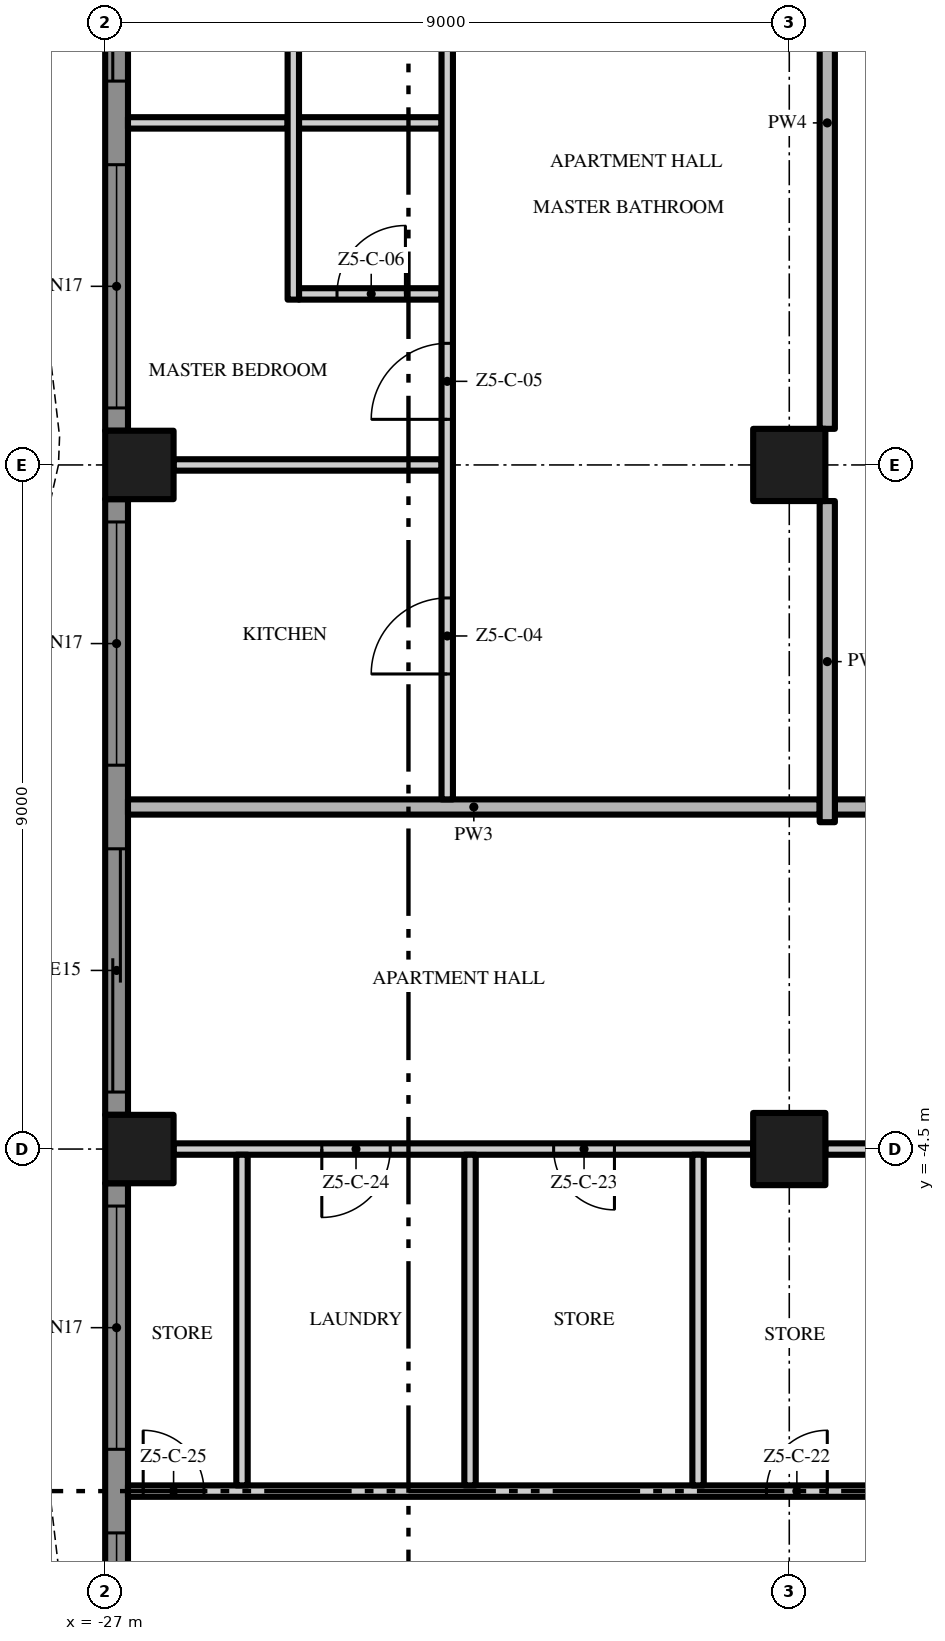
"""IFC4 building model, lengths in metres.
Left out: names, types, materials, properties, quantities, classifications, styles, units other than length and angle.
Written with IfcOpenShell. Run it as: python <this file> out.ifc"""

import sys

from ifc_helpers import new_model, si_unit, direction, frame, frame_2d, origin, origin_2d, place, context, subcontext, project, spatial, polyline, rectangle, outline, extrude, element, fill, save


model = new_model("IFC4")
c1 = context("Model", 3, precision=1e-05, world=origin(), true_north=direction((0.0, 1.0)))
c2 = subcontext(c1, "Body", "Model", "MODEL_VIEW")
j1 = project(units=[si_unit("LENGTHUNIT", "METRE"), si_unit("PLANEANGLEUNIT", "RADIAN")], contexts=[c1])
p1 = place(None, origin())
s1 = spatial("IfcSite", under=j1, at=p1, CompositionType="ELEMENT")
p2 = place(p1, origin())
s2 = spatial("IfcBuilding", under=s1, at=p2, CompositionType="ELEMENT")
p3 = place(p2, frame((0.0, 0.0, 269.2)))
s3 = spatial("IfcBuildingStorey", under=s2, at=p3, CompositionType="ELEMENT", Elevation=269.2)
for number, where, z_axis, x_axis in (
    (1, (-18.0, -4.5, 0.0), (0.0, 0.0, 1.0), (1.0, 0.0, 0.0)),
    (2, (-18.0, 4.5, 0.0), (0.0, 0.0, 1.0), (1.0, 0.0, 0.0)),
):
    element("IfcColumn", number, at=place(p3, frame(where, z_axis=z_axis, x_axis=x_axis)), inside=s3, PredefinedType="COLUMN", context=c2, shape_type="SweptSolid", body=[
        extrude(rectangle(XDim=0.95, YDim=0.95, at=origin_2d()), origin(), (0.0, 0.0, 1.0), 3.5),
    ])
for number, where, z_axis, x_axis in (
    (3, (-26.55, -4.5, 0.0), (0.0, 0.0, 1.0), (1.0, 0.0, 0.0)),
    (4, (-26.55, 4.5, 0.0), (0.0, 0.0, 1.0), (1.0, 0.0, 0.0)),
):
    element("IfcColumn", number, at=place(p3, frame(where, z_axis=z_axis, x_axis=x_axis)), inside=s3, PredefinedType="COLUMN", context=c2, shape_type="SweptSolid", body=[
        extrude(rectangle(XDim=0.9, YDim=0.9, at=origin_2d()), origin(), (0.0, 0.0, 1.0), 3.5),
    ])
p4 = place(p3, frame((-26.85, 4.95, 0.0), z_axis=(0.0, 0.0, 1.0), x_axis=(0.0, 1.0, 0.0)))
e5 = element("IfcWall", 5, at=p4, inside=s3, PredefinedType="SOLIDWALL", context=c2, shape_type="SweptSolid", body=[
    extrude(rectangle(XDim=8.1, YDim=0.3, at=frame_2d((4.05, 0.0))), origin(), (0.0, 0.0, 1.0), 3.5),
])
p5 = place(p4, frame((4.6, 0.0, 0.0)))
e6 = element("IfcOpeningElement", 6, at=p5, cuts=e5, PredefinedType="OPENING", context=c2, shape_type="SweptSolid", body=[
    extrude(rectangle(XDim=3.2, YDim=2.4, at=frame_2d((1.6, 1.2))), frame((0.0, 0.16, 0.0), z_axis=(0.0, -1.0, 0.0), x_axis=(1.0, 0.0, 0.0)), (0.0, 0.0, 1.0), 0.32),
])
p6 = place(p4, frame((0.3, 0.0, 0.45)))
e7 = element("IfcOpeningElement", 7, at=p6, cuts=e5, PredefinedType="OPENING", context=c2, shape_type="SweptSolid", body=[
    extrude(rectangle(XDim=3.2, YDim=2.65, at=frame_2d((1.6, 1.325))), frame((0.0, 0.16, 0.0), z_axis=(0.0, -1.0, 0.0), x_axis=(1.0, 0.0, 0.0)), (0.0, 0.0, 1.0), 0.32),
])
p7 = place(p3, frame((-26.85, -4.05, 0.0), z_axis=(0.0, 0.0, 1.0), x_axis=(0.0, 1.0, 0.0)))
e8 = element("IfcWall", 8, at=p7, inside=s3, PredefinedType="SOLIDWALL", context=c2, shape_type="SweptSolid", body=[
    extrude(rectangle(XDim=8.1, YDim=0.3, at=frame_2d((4.05, 0.0))), origin(), (0.0, 0.0, 1.0), 3.5),
])
p8 = place(p7, frame((4.6, 0.0, 0.45)))
e9 = element("IfcOpeningElement", 9, at=p8, cuts=e8, PredefinedType="OPENING", context=c2, shape_type="SweptSolid", body=[
    extrude(rectangle(XDim=3.2, YDim=2.65, at=frame_2d((1.6, 1.325))), frame((0.0, 0.16, 0.0), z_axis=(0.0, -1.0, 0.0), x_axis=(1.0, 0.0, 0.0)), (0.0, 0.0, 1.0), 0.32),
])
p9 = place(p7, frame((0.3, 0.0, 0.0)))
e10 = element("IfcOpeningElement", 10, at=p9, cuts=e8, PredefinedType="OPENING", context=c2, shape_type="SweptSolid", body=[
    extrude(rectangle(XDim=3.2, YDim=2.4, at=frame_2d((1.6, 1.2))), frame((0.0, 0.16, 0.0), z_axis=(0.0, -1.0, 0.0), x_axis=(1.0, 0.0, 0.0)), (0.0, 0.0, 1.0), 0.32),
])
p10 = place(p3, frame((-26.85, -13.05, 0.0), z_axis=(0.0, 0.0, 1.0), x_axis=(0.0, 1.0, 0.0)))
e11 = element("IfcWall", 11, at=p10, inside=s3, PredefinedType="SOLIDWALL", context=c2, shape_type="SweptSolid", body=[
    extrude(rectangle(XDim=8.1, YDim=0.3, at=frame_2d((4.05, 0.0))), origin(), (0.0, 0.0, 1.0), 3.5),
])
p11 = place(p10, frame((4.6, 0.0, 0.45)))
e12 = element("IfcOpeningElement", 12, at=p11, cuts=e11, PredefinedType="OPENING", context=c2, shape_type="SweptSolid", body=[
    extrude(rectangle(XDim=3.2, YDim=2.65, at=frame_2d((1.6, 1.325))), frame((0.0, 0.16, 0.0), z_axis=(0.0, -1.0, 0.0), x_axis=(1.0, 0.0, 0.0)), (0.0, 0.0, 1.0), 0.32),
])
p12 = place(p10, frame((0.3, 0.0, 0.45)))
e13 = element("IfcOpeningElement", 13, at=p12, cuts=e11, PredefinedType="OPENING", context=c2, shape_type="SweptSolid", body=[
    extrude(rectangle(XDim=3.2, YDim=2.65, at=frame_2d((1.6, 1.325))), frame((0.0, 0.16, 0.0), z_axis=(0.0, -1.0, 0.0), x_axis=(1.0, 0.0, 0.0)), (0.0, 0.0, 1.0), 0.32),
])
p13 = place(p3, origin())
e14 = element("IfcWall", 14, at=p13, inside=s3, PredefinedType="USERDEFINED", context=c2, shape_type="SweptSolid", body=[
    extrude(outline(polyline([(-27.951, 18.0), (-28.612, 16.5), (-29.345, 15.0), (-29.869, 13.5), (-30.0, 12.375), (-29.985, 12.0), (-29.649, 10.5), (-28.988, 9.0), (-28.255, 7.5), (-27.731, 6.0), (-27.6, 4.875), (-27.615, 4.5), (-27.951, 3.0), (-28.612, 1.5), (-29.345, 0.0), (-29.869, -1.5), (-30.0, -2.625), (-29.985, -3.0), (-29.649, -4.5), (-28.988, -6.0), (-28.255, -7.5), (-27.731, -9.0), (-27.6, -10.125), (-27.615, -10.5), (-27.951, -12.0), (-28.612, -13.5), (-29.345, -15.0), (-29.869, -16.5), (-30.0, -17.625), (-29.985, -18.0), (-29.735, -17.99), (-29.749, -17.635), (-29.624, -16.556), (-29.114, -15.096), (-28.385, -13.605), (-27.713, -12.079), (-27.366, -10.533), (-27.349, -10.115), (-27.486, -8.944), (-28.024, -7.404), (-28.761, -5.895), (-29.41, -4.421), (-29.736, -2.967), (-29.749, -2.635), (-29.624, -1.556), (-29.114, -0.096), (-28.385, 1.395), (-27.713, 2.921), (-27.366, 4.467), (-27.349, 4.885), (-27.486, 6.056), (-28.024, 7.596), (-28.761, 9.105), (-29.41, 10.579), (-29.736, 12.033), (-29.749, 12.365), (-29.624, 13.444), (-29.114, 14.904), (-28.385, 16.395), (-27.723, 17.899), (-27.951, 18.0)])), origin(), (0.0, 0.0, 1.0), 0.9),
])
p14 = place(p3, frame((-26.7, -9.0, 0.0), z_axis=(0.0, 0.0, 1.0), x_axis=(1.0, 0.0, 0.0)))
e15 = element("IfcWall", 15, at=p14, inside=s3, PredefinedType="PARTITIONING", context=c2, shape_type="SweptSolid", body=[
    extrude(rectangle(XDim=12.675, YDim=0.15, at=frame_2d((6.338, 0.0))), origin(), (0.0, 0.0, 1.0), 3.5),
])
p15 = place(p14, frame((8.4, 0.0, 0.0)))
e16 = element("IfcOpeningElement", 16, at=p15, cuts=e15, PredefinedType="OPENING", context=c2, shape_type="SweptSolid", body=[
    extrude(rectangle(XDim=0.8, YDim=2.0, at=frame_2d((0.4, 1.0))), frame((0.0, 0.085, 0.0), z_axis=(0.0, -1.0, 0.0), x_axis=(1.0, 0.0, 0.0)), (0.0, 0.0, 1.0), 0.17),
])
p16 = place(p14, frame((0.2, 0.0, 0.0)))
e17 = element("IfcOpeningElement", 17, at=p16, cuts=e15, PredefinedType="OPENING", context=c2, shape_type="SweptSolid", body=[
    extrude(rectangle(XDim=0.8, YDim=2.0, at=frame_2d((0.4, 1.0))), frame((0.0, 0.085, 0.0), z_axis=(0.0, -1.0, 0.0), x_axis=(1.0, 0.0, 0.0)), (0.0, 0.0, 1.0), 0.17),
])
p17 = place(p3, frame((-18.475, -4.5, 0.0), z_axis=(0.0, 0.0, 1.0), x_axis=(-1.0, 0.0, 0.0)))
e18 = element("IfcWall", 18, at=p17, inside=s3, PredefinedType="PARTITIONING", context=c2, shape_type="SweptSolid", body=[
    extrude(rectangle(XDim=7.625, YDim=0.15, at=frame_2d((3.812, 0.0))), origin(), (0.0, 0.0, 1.0), 3.5),
])
p18 = place(p17, frame((1.825, 0.0, 0.0)))
e19 = element("IfcOpeningElement", 19, at=p18, cuts=e18, PredefinedType="OPENING", context=c2, shape_type="SweptSolid", body=[
    extrude(rectangle(XDim=0.8, YDim=2.0, at=frame_2d((0.4, 1.0))), frame((0.0, 0.085, 0.0), z_axis=(0.0, -1.0, 0.0), x_axis=(1.0, 0.0, 0.0)), (0.0, 0.0, 1.0), 0.17),
])
p19 = place(p17, frame((4.775, 0.0, 0.0)))
e20 = element("IfcOpeningElement", 20, at=p19, cuts=e18, PredefinedType="OPENING", context=c2, shape_type="SweptSolid", body=[
    extrude(rectangle(XDim=0.9, YDim=2.1, at=frame_2d((0.45, 1.05))), frame((0.0, 0.085, 0.0), z_axis=(0.0, -1.0, 0.0), x_axis=(1.0, 0.0, 0.0)), (0.0, 0.0, 1.0), 0.17),
])
p20 = place(p3, frame((-14.025, -4.5, 0.0), z_axis=(0.0, 0.0, 1.0), x_axis=(-1.0, 0.0, 0.0)))
e21 = element("IfcWall", 21, at=p20, inside=s3, PredefinedType="PARTITIONING", context=c2, shape_type="SweptSolid", body=[
    extrude(rectangle(XDim=3.5, YDim=0.15, at=frame_2d((1.75, 0.0))), origin(), (0.0, 0.0, 1.0), 3.5),
])
p21 = place(p20, frame((0.875, 0.0, 0.0)))
e22 = element("IfcOpeningElement", 22, at=p21, cuts=e21, PredefinedType="OPENING", context=c2, shape_type="SweptSolid", body=[
    extrude(rectangle(XDim=0.8, YDim=2.0, at=frame_2d((0.4, 1.0))), frame((0.0, 0.085, 0.0), z_axis=(0.0, -1.0, 0.0), x_axis=(1.0, 0.0, 0.0)), (0.0, 0.0, 1.0), 0.17),
])
p22 = place(p3, frame((17.4, 0.0, 0.0), z_axis=(0.0, 0.0, 1.0), x_axis=(-1.0, 0.0, 0.0)))
e23 = element("IfcWall", 23, at=p22, inside=s3, PredefinedType="PARTITIONING", context=c2, shape_type="SweptSolid", body=[
    extrude(rectangle(XDim=34.8, YDim=0.2, at=frame_2d((17.4, 0.0))), origin(), (0.0, 0.0, 1.0), 3.5),
])
p23 = place(p22, frame((23.4, 0.0, 0.0)))
e24 = element("IfcOpeningElement", 24, at=p23, cuts=e23, PredefinedType="OPENING", context=c2, shape_type="SweptSolid", body=[
    extrude(rectangle(XDim=1.5, YDim=2.4, at=frame_2d((0.75, 1.2))), frame((0.0, 0.11, 0.0), z_axis=(0.0, -1.0, 0.0), x_axis=(1.0, 0.0, 0.0)), (0.0, 0.0, 1.0), 0.22),
])
p24 = place(p22, frame((5.4, 0.0, 0.0)))
e25 = element("IfcOpeningElement", 25, at=p24, cuts=e23, PredefinedType="OPENING", context=c2, shape_type="SweptSolid", body=[
    extrude(rectangle(XDim=1.5, YDim=2.4, at=frame_2d((0.75, 1.2))), frame((0.0, 0.11, 0.0), z_axis=(0.0, -1.0, 0.0), x_axis=(1.0, 0.0, 0.0)), (0.0, 0.0, 1.0), 0.22),
])
p25 = place(p3, frame((-26.7, 0.0, 0.0), z_axis=(0.0, 0.0, 1.0), x_axis=(1.0, 0.0, 0.0)))
e26 = element("IfcWall", 26, at=p25, inside=s3, PredefinedType="PARTITIONING", context=c2, shape_type="SweptSolid", body=[
    extrude(rectangle(XDim=9.1, YDim=0.2, at=frame_2d((4.55, 0.0))), origin(), (0.0, 0.0, 1.0), 3.5),
])
p26 = place(p3, frame((-26.1, 4.5, 0.0), z_axis=(0.0, 0.0, 1.0), x_axis=(1.0, 0.0, 0.0)))
e27 = element("IfcWall", 27, at=p26, inside=s3, PredefinedType="PARTITIONING", context=c2, shape_type="SweptSolid", body=[
    extrude(rectangle(XDim=3.525, YDim=0.15, at=frame_2d((1.762, 0.0))), origin(), (0.0, 0.0, 1.0), 3.5),
])
p27 = place(p3, frame((-24.45, 6.75, 0.0), z_axis=(0.0, 0.0, 1.0), x_axis=(1.0, 0.0, 0.0)))
e28 = element("IfcWall", 28, at=p27, inside=s3, PredefinedType="PARTITIONING", context=c2, shape_type="SweptSolid", body=[
    extrude(rectangle(XDim=1.875, YDim=0.15, at=frame_2d((0.938, 0.0))), origin(), (0.0, 0.0, 1.0), 3.5),
])
p28 = place(p27, frame((0.5, 0.0, 0.0)))
e29 = element("IfcOpeningElement", 29, at=p28, cuts=e28, PredefinedType="OPENING", context=c2, shape_type="SweptSolid", body=[
    extrude(rectangle(XDim=0.9, YDim=2.1, at=frame_2d((0.45, 1.05))), frame((0.0, 0.085, 0.0), z_axis=(0.0, -1.0, 0.0), x_axis=(1.0, 0.0, 0.0)), (0.0, 0.0, 1.0), 0.17),
])
p29 = place(p3, frame((-26.7, 9.0, 0.0), z_axis=(0.0, 0.0, 1.0), x_axis=(1.0, 0.0, 0.0)))
e30 = element("IfcWall", 30, at=p29, inside=s3, PredefinedType="PARTITIONING", context=c2, shape_type="SweptSolid", body=[
    extrude(rectangle(XDim=2.1, YDim=0.15, at=frame_2d((1.05, 0.0))), origin(), (0.0, 0.0, 1.0), 3.5),
])
p30 = place(p3, frame((-24.45, 9.0, 0.0), z_axis=(0.0, 0.0, 1.0), x_axis=(1.0, 0.0, 0.0)))
e31 = element("IfcWall", 31, at=p30, inside=s3, PredefinedType="PARTITIONING", context=c2, shape_type="SweptSolid", body=[
    extrude(rectangle(XDim=1.875, YDim=0.15, at=frame_2d((0.938, 0.0))), origin(), (0.0, 0.0, 1.0), 3.5),
])
p31 = place(p3, frame((-25.2, -8.925, 0.0), z_axis=(0.0, 0.0, 1.0), x_axis=(0.0, 1.0, 0.0)))
e32 = element("IfcWall", 32, at=p31, inside=s3, PredefinedType="PARTITIONING", context=c2, shape_type="SweptSolid", body=[
    extrude(rectangle(XDim=4.35, YDim=0.15, at=frame_2d((2.175, 0.0))), origin(), (0.0, 0.0, 1.0), 3.5),
])
p32 = place(p3, frame((-24.525, 6.675, 0.0), z_axis=(0.0, 0.0, 1.0), x_axis=(0.0, 1.0, 0.0)))
e33 = element("IfcWall", 33, at=p32, inside=s3, PredefinedType="PARTITIONING", context=c2, shape_type="SweptSolid", body=[
    extrude(rectangle(XDim=4.65, YDim=0.15, at=frame_2d((2.325, 0.0))), origin(), (0.0, 0.0, 1.0), 3.5),
])
p33 = place(p3, frame((-22.5, 0.1, 0.0), z_axis=(0.0, 0.0, 1.0), x_axis=(0.0, 1.0, 0.0)))
e34 = element("IfcWall", 34, at=p33, inside=s3, PredefinedType="PARTITIONING", context=c2, shape_type="SweptSolid", body=[
    extrude(rectangle(XDim=17.45, YDim=0.15, at=frame_2d((8.725, 0.0))), origin(), (0.0, 0.0, 1.0), 3.5),
])
p34 = place(p33, frame((1.65, 0.0, 0.0)))
e35 = element("IfcOpeningElement", 35, at=p34, cuts=e34, PredefinedType="OPENING", context=c2, shape_type="SweptSolid", body=[
    extrude(rectangle(XDim=1.0, YDim=2.4, at=frame_2d((0.5, 1.2))), frame((0.0, 0.085, 0.0), z_axis=(0.0, -1.0, 0.0), x_axis=(1.0, 0.0, 0.0)), (0.0, 0.0, 1.0), 0.17),
])
p35 = place(p33, frame((5.0, 0.0, 0.0)))
e36 = element("IfcOpeningElement", 36, at=p35, cuts=e34, PredefinedType="OPENING", context=c2, shape_type="SweptSolid", body=[
    extrude(rectangle(XDim=1.0, YDim=2.4, at=frame_2d((0.5, 1.2))), frame((0.0, 0.085, 0.0), z_axis=(0.0, -1.0, 0.0), x_axis=(1.0, 0.0, 0.0)), (0.0, 0.0, 1.0), 0.17),
])
p36 = place(p33, frame((13.25, 0.0, 0.0)))
e37 = element("IfcOpeningElement", 37, at=p36, cuts=e34, PredefinedType="OPENING", context=c2, shape_type="SweptSolid", body=[
    extrude(rectangle(XDim=1.8, YDim=2.4, at=frame_2d((0.9, 1.2))), frame((0.0, 0.085, 0.0), z_axis=(0.0, -1.0, 0.0), x_axis=(1.0, 0.0, 0.0)), (0.0, 0.0, 1.0), 0.17),
])
for number, where, z_axis, x_axis in (
    (38, (-22.2, -8.925, 0.0), (0.0, 0.0, 1.0), (0.0, 1.0, 0.0)),
    (39, (-19.2, -8.925, 0.0), (0.0, 0.0, 1.0), (0.0, 1.0, 0.0)),
):
    element("IfcWall", number, at=place(p3, frame(where, z_axis=z_axis, x_axis=x_axis)), inside=s3, PredefinedType="PARTITIONING", context=c2, shape_type="SweptSolid", body=[
        extrude(rectangle(XDim=4.35, YDim=0.15, at=frame_2d((2.175, 0.0))), origin(), (0.0, 0.0, 1.0), 3.5),
    ])
p37 = place(p3, frame((-17.5, -0.2, 0.0), z_axis=(0.0, 0.0, 1.0), x_axis=(0.0, 1.0, 0.0)))
e40 = element("IfcWall", 40, at=p37, inside=s3, PredefinedType="PARTITIONING", context=c2, shape_type="SweptSolid", body=[
    extrude(rectangle(XDim=4.225, YDim=0.2, at=frame_2d((2.112, 0.0))), origin(), (0.0, 0.0, 1.0), 3.5),
])
p38 = place(p3, frame((-17.5, 4.975, 0.0), z_axis=(0.0, 0.0, 1.0), x_axis=(0.0, 1.0, 0.0)))
e41 = element("IfcWall", 41, at=p38, inside=s3, PredefinedType="PARTITIONING", context=c2, shape_type="SweptSolid", body=[
    extrude(rectangle(XDim=8.05, YDim=0.2, at=frame_2d((4.025, 0.0))), origin(), (0.0, 0.0, 1.0), 3.5),
])
p39 = place(p5, origin())
e42 = element("IfcDoor", 42, at=p39, inside=s3, OperationType="SINGLE_SWING_LEFT", PredefinedType="DOOR", context=c2, shape_type="SweptSolid", body=[
    extrude(rectangle(XDim=3.2, YDim=2.4, at=frame_2d((1.6, 1.2))), frame((0.0, 0.025, 0.0), z_axis=(0.0, -1.0, 0.0), x_axis=(1.0, 0.0, 0.0)), (0.0, 0.0, 1.0), 0.05),
])
fill(e6, e42)
p40 = place(p6, origin())
e43 = element("IfcWindow", 43, at=p40, inside=s3, PartitioningType="SINGLE_PANEL", PredefinedType="WINDOW", context=c2, shape_type="SweptSolid", body=[
    extrude(rectangle(XDim=3.2, YDim=2.65, at=frame_2d((1.6, 1.325))), frame((0.0, 0.03, 0.0), z_axis=(0.0, -1.0, 0.0), x_axis=(1.0, 0.0, 0.0)), (0.0, 0.0, 1.0), 0.06),
])
fill(e7, e43)
p41 = place(p8, origin())
e44 = element("IfcWindow", 44, at=p41, inside=s3, PartitioningType="SINGLE_PANEL", PredefinedType="WINDOW", context=c2, shape_type="SweptSolid", body=[
    extrude(rectangle(XDim=3.2, YDim=2.65, at=frame_2d((1.6, 1.325))), frame((0.0, 0.03, 0.0), z_axis=(0.0, -1.0, 0.0), x_axis=(1.0, 0.0, 0.0)), (0.0, 0.0, 1.0), 0.06),
])
fill(e9, e44)
p42 = place(p9, origin())
e45 = element("IfcDoor", 45, at=p42, inside=s3, OperationType="SINGLE_SWING_LEFT", PredefinedType="DOOR", context=c2, shape_type="SweptSolid", body=[
    extrude(rectangle(XDim=3.2, YDim=2.4, at=frame_2d((1.6, 1.2))), frame((0.0, 0.025, 0.0), z_axis=(0.0, -1.0, 0.0), x_axis=(1.0, 0.0, 0.0)), (0.0, 0.0, 1.0), 0.05),
])
fill(e10, e45)
p43 = place(p11, origin())
e46 = element("IfcWindow", 46, at=p43, inside=s3, PartitioningType="SINGLE_PANEL", PredefinedType="WINDOW", context=c2, shape_type="SweptSolid", body=[
    extrude(rectangle(XDim=3.2, YDim=2.65, at=frame_2d((1.6, 1.325))), frame((0.0, 0.03, 0.0), z_axis=(0.0, -1.0, 0.0), x_axis=(1.0, 0.0, 0.0)), (0.0, 0.0, 1.0), 0.06),
])
fill(e12, e46)
p44 = place(p12, origin())
e47 = element("IfcWindow", 47, at=p44, inside=s3, PartitioningType="SINGLE_PANEL", PredefinedType="WINDOW", context=c2, shape_type="SweptSolid", body=[
    extrude(rectangle(XDim=3.2, YDim=2.65, at=frame_2d((1.6, 1.325))), frame((0.0, 0.03, 0.0), z_axis=(0.0, -1.0, 0.0), x_axis=(1.0, 0.0, 0.0)), (0.0, 0.0, 1.0), 0.06),
])
fill(e13, e47)
p45 = place(p34, origin())
e48 = element("IfcDoor", 48, at=p45, inside=s3, OperationType="SINGLE_SWING_LEFT", PredefinedType="DOOR", context=c2, shape_type="SweptSolid", body=[
    extrude(rectangle(XDim=1.0, YDim=2.4, at=frame_2d((0.5, 1.2))), frame((0.0, 0.025, 0.0), z_axis=(0.0, -1.0, 0.0), x_axis=(1.0, 0.0, 0.0)), (0.0, 0.0, 1.0), 0.05),
])
fill(e35, e48)
p46 = place(p35, origin())
e49 = element("IfcDoor", 49, at=p46, inside=s3, OperationType="SINGLE_SWING_LEFT", PredefinedType="DOOR", context=c2, shape_type="SweptSolid", body=[
    extrude(rectangle(XDim=1.0, YDim=2.4, at=frame_2d((0.5, 1.2))), frame((0.0, 0.025, 0.0), z_axis=(0.0, -1.0, 0.0), x_axis=(1.0, 0.0, 0.0)), (0.0, 0.0, 1.0), 0.05),
])
fill(e36, e49)
p47 = place(p28, origin())
e50 = element("IfcDoor", 50, at=p47, inside=s3, OperationType="SINGLE_SWING_RIGHT", PredefinedType="DOOR", context=c2, shape_type="SweptSolid", body=[
    extrude(rectangle(XDim=0.9, YDim=2.1, at=frame_2d((0.45, 1.05))), frame((0.0, 0.025, 0.0), z_axis=(0.0, -1.0, 0.0), x_axis=(1.0, 0.0, 0.0)), (0.0, 0.0, 1.0), 0.05),
])
fill(e29, e50)
p48 = place(p15, origin())
e51 = element("IfcDoor", 51, at=p48, inside=s3, OperationType="SINGLE_SWING_RIGHT", PredefinedType="DOOR", context=c2, shape_type="SweptSolid", body=[
    extrude(rectangle(XDim=0.8, YDim=2.0, at=frame_2d((0.4, 1.0))), frame((0.0, 0.025, 0.0), z_axis=(0.0, -1.0, 0.0), x_axis=(1.0, 0.0, 0.0)), (0.0, 0.0, 1.0), 0.05),
])
fill(e16, e51)
p49 = place(p18, origin())
e52 = element("IfcDoor", 52, at=p49, inside=s3, OperationType="SINGLE_SWING_LEFT", PredefinedType="DOOR", context=c2, shape_type="SweptSolid", body=[
    extrude(rectangle(XDim=0.8, YDim=2.0, at=frame_2d((0.4, 1.0))), frame((0.0, 0.025, 0.0), z_axis=(0.0, -1.0, 0.0), x_axis=(1.0, 0.0, 0.0)), (0.0, 0.0, 1.0), 0.05),
])
fill(e19, e52)
p50 = place(p19, origin())
e53 = element("IfcDoor", 53, at=p50, inside=s3, OperationType="SINGLE_SWING_RIGHT", PredefinedType="DOOR", context=c2, shape_type="SweptSolid", body=[
    extrude(rectangle(XDim=0.9, YDim=2.1, at=frame_2d((0.45, 1.05))), frame((0.0, 0.025, 0.0), z_axis=(0.0, -1.0, 0.0), x_axis=(1.0, 0.0, 0.0)), (0.0, 0.0, 1.0), 0.05),
])
fill(e20, e53)
p51 = place(p16, origin())
e54 = element("IfcDoor", 54, at=p51, inside=s3, OperationType="SINGLE_SWING_LEFT", PredefinedType="DOOR", context=c2, shape_type="SweptSolid", body=[
    extrude(rectangle(XDim=0.8, YDim=2.0, at=frame_2d((0.4, 1.0))), frame((0.0, 0.025, 0.0), z_axis=(0.0, -1.0, 0.0), x_axis=(1.0, 0.0, 0.0)), (0.0, 0.0, 1.0), 0.05),
])
fill(e17, e54)
save(model, sys.argv[1])
